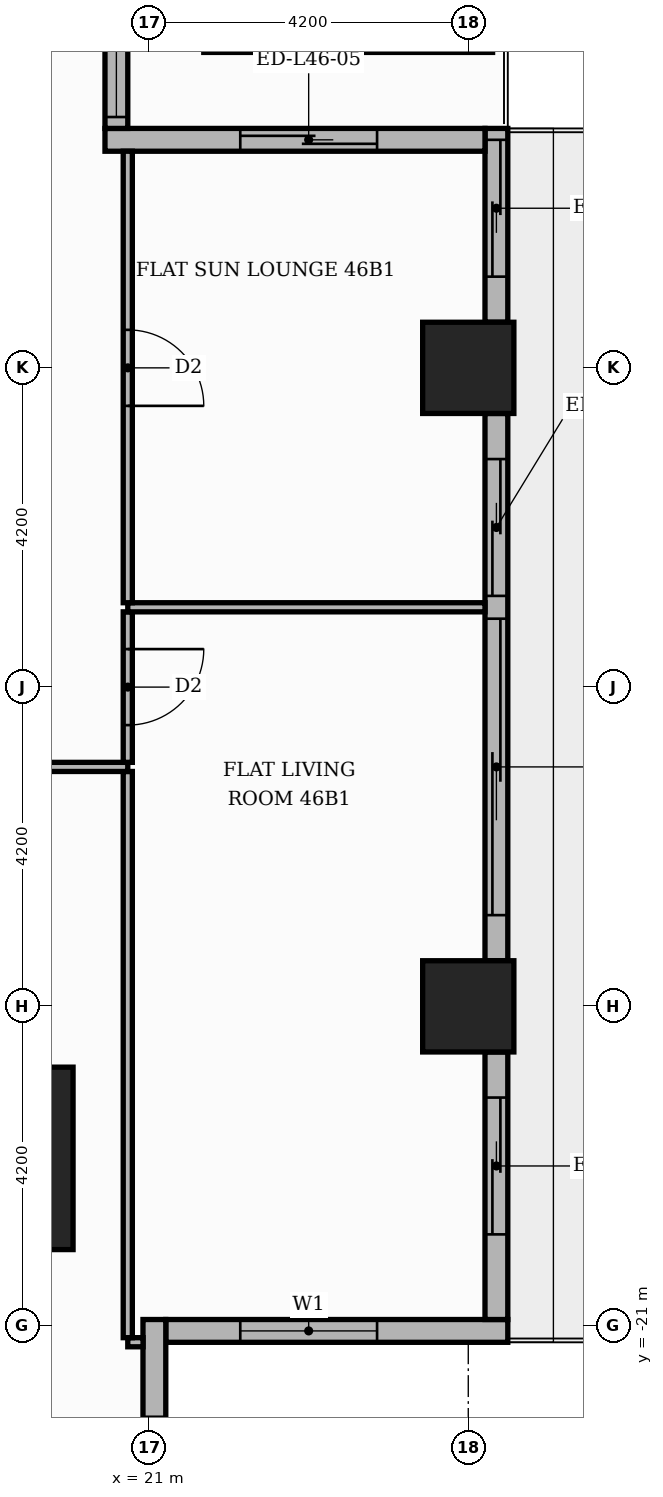
"""IFC4 building model, lengths in metres.
Left out: names, types, materials, properties, quantities, classifications, styles, units other than length and angle.
Written with IfcOpenShell. Run it as: python <this file> out.ifc"""

import sys

from ifc_helpers import new_model, si_unit, direction, frame, frame_2d, origin, origin_2d, place, context, subcontext, project, spatial, rectangle, extrude, element, fill, save


model = new_model("IFC4")
c1 = context("Model", 3, precision=1e-05, world=origin(), true_north=direction((0.0, 1.0)))
c2 = subcontext(c1, "Body", "Model", "MODEL_VIEW")
j1 = project(units=[si_unit("LENGTHUNIT", "METRE"), si_unit("PLANEANGLEUNIT", "RADIAN")], contexts=[c1])
p1 = place(None, origin())
s1 = spatial("IfcSite", under=j1, at=p1, CompositionType="ELEMENT")
p2 = place(p1, origin())
s2 = spatial("IfcBuilding", under=s1, at=p2, CompositionType="ELEMENT")
p3 = place(p2, frame((0.0, 0.0, 196.2)))
s3 = spatial("IfcBuildingStorey", under=s2, at=p3, CompositionType="ELEMENT", Elevation=196.2)
p4 = place(p3, frame((18.8, -18.8, 0.0), z_axis=(0.0, 0.0, 1.0), x_axis=(1.0, 0.0, 0.0)))
e1 = element("IfcColumn", 1, at=p4, inside=s3, PredefinedType="COLUMN", context=c2, shape_type="SweptSolid", body=[
    extrude(rectangle(XDim=2.4, YDim=2.4, at=origin_2d()), origin(), (0.0, 0.0, 1.0), 3.9),
])
for number, where, z_axis, x_axis in (
    (2, (25.2, -8.4, 0.0), (0.0, 0.0, 1.0), (1.0, 0.0, 0.0)),
    (3, (25.2, -16.8, 0.0), (0.0, 0.0, 1.0), (1.0, 0.0, 0.0)),
):
    element("IfcColumn", number, at=place(p3, frame(where, z_axis=z_axis, x_axis=x_axis)), inside=s3, PredefinedType="COLUMN", context=c2, shape_type="SweptSolid", body=[
        extrude(rectangle(XDim=1.2, YDim=1.2, at=origin_2d()), origin(), (0.0, 0.0, 1.0), 3.9),
    ])
p5 = place(p3, frame((21.22, -21.07, 0.0), z_axis=(0.0, 0.0, 1.0), x_axis=(1.0, 0.0, 0.0)))
e4 = element("IfcWall", 4, at=p5, inside=s3, PredefinedType="STANDARD", context=c2, shape_type="SweptSolid", body=[
    extrude(rectangle(XDim=4.5, YDim=0.3, at=frame_2d((2.25, 0.0))), origin(), (0.0, 0.0, 1.0), 3.48),
])
p6 = place(p5, frame((0.98, 0.0, 0.9)))
e5 = element("IfcOpeningElement", 5, at=p6, cuts=e4, PredefinedType="OPENING", context=c2, shape_type="SweptSolid", body=[
    extrude(rectangle(XDim=1.8, YDim=2.1, at=frame_2d((0.9, 1.05))), frame((0.0, 0.16, 0.0), z_axis=(0.0, -1.0, 0.0), x_axis=(1.0, 0.0, 0.0)), (0.0, 0.0, 1.0), 0.32),
])
p7 = place(p3, frame((25.57, -20.92, 0.0), z_axis=(0.0, 0.0, 1.0), x_axis=(0.0, 1.0, 0.0)))
e6 = element("IfcWall", 6, at=p7, inside=s3, PredefinedType="STANDARD", context=c2, shape_type="SweptSolid", body=[
    extrude(rectangle(XDim=3.52, YDim=0.3, at=frame_2d((1.76, 0.0))), origin(), (0.0, 0.0, 1.0), 3.48),
])
p8 = place(p7, frame((1.12, 0.0, 0.0)))
e7 = element("IfcOpeningElement", 7, at=p8, cuts=e6, PredefinedType="OPENING", context=c2, shape_type="SweptSolid", body=[
    extrude(rectangle(XDim=1.8, YDim=2.4, at=frame_2d((0.9, 1.2))), frame((0.0, 0.16, 0.0), z_axis=(0.0, -1.0, 0.0), x_axis=(1.0, 0.0, 0.0)), (0.0, 0.0, 1.0), 0.32),
])
p9 = place(p3, frame((25.57, -16.2, 0.0), z_axis=(0.0, 0.0, 1.0), x_axis=(0.0, 1.0, 0.0)))
e8 = element("IfcWall", 8, at=p9, inside=s3, PredefinedType="STANDARD", context=c2, shape_type="SweptSolid", body=[
    extrude(rectangle(XDim=7.2, YDim=0.3, at=frame_2d((3.6, 0.0))), origin(), (0.0, 0.0, 1.0), 3.48),
])
p10 = place(p9, frame((0.6, 0.0, 0.0)))
e9 = element("IfcOpeningElement", 9, at=p10, cuts=e8, PredefinedType="OPENING", context=c2, shape_type="SweptSolid", body=[
    extrude(rectangle(XDim=3.9, YDim=2.4, at=frame_2d((1.95, 1.2))), frame((0.0, 0.16, 0.0), z_axis=(0.0, -1.0, 0.0), x_axis=(1.0, 0.0, 0.0)), (0.0, 0.0, 1.0), 0.32),
])
p11 = place(p9, frame((4.8, 0.0, 0.0)))
e10 = element("IfcOpeningElement", 10, at=p11, cuts=e8, PredefinedType="OPENING", context=c2, shape_type="SweptSolid", body=[
    extrude(rectangle(XDim=1.8, YDim=2.4, at=frame_2d((0.9, 1.2))), frame((0.0, 0.16, 0.0), z_axis=(0.0, -1.0, 0.0), x_axis=(1.0, 0.0, 0.0)), (0.0, 0.0, 1.0), 0.32),
])
p12 = place(p3, frame((25.57, -7.8, 0.0), z_axis=(0.0, 0.0, 1.0), x_axis=(0.0, 1.0, 0.0)))
e11 = element("IfcWall", 11, at=p12, inside=s3, PredefinedType="STANDARD", context=c2, shape_type="SweptSolid", body=[
    extrude(rectangle(XDim=2.55, YDim=0.3, at=frame_2d((1.275, 0.0))), origin(), (0.0, 0.0, 1.0), 3.48),
])
p13 = place(p12, frame((0.6, 0.0, 0.0)))
e12 = element("IfcOpeningElement", 12, at=p13, cuts=e11, PredefinedType="OPENING", context=c2, shape_type="SweptSolid", body=[
    extrude(rectangle(XDim=1.8, YDim=2.4, at=frame_2d((0.9, 1.2))), frame((0.0, 0.16, 0.0), z_axis=(0.0, -1.0, 0.0), x_axis=(1.0, 0.0, 0.0)), (0.0, 0.0, 1.0), 0.32),
])
p14 = place(p3, frame((25.42, -5.4, 0.0), z_axis=(0.0, 0.0, 1.0), x_axis=(-1.0, 0.0, 0.0)))
e13 = element("IfcWall", 13, at=p14, inside=s3, PredefinedType="STANDARD", context=c2, shape_type="SweptSolid", body=[
    extrude(rectangle(XDim=5.0, YDim=0.3, at=frame_2d((2.5, 0.0))), origin(), (0.0, 0.0, 1.0), 3.48),
])
p15 = place(p14, frame((1.42, 0.0, 0.0)))
e14 = element("IfcOpeningElement", 14, at=p15, cuts=e13, PredefinedType="OPENING", context=c2, shape_type="SweptSolid", body=[
    extrude(rectangle(XDim=1.8, YDim=2.4, at=frame_2d((0.9, 1.2))), frame((0.0, 0.16, 0.0), z_axis=(0.0, -1.0, 0.0), x_axis=(1.0, 0.0, 0.0)), (0.0, 0.0, 1.0), 0.32),
])
p16 = place(p3, frame((20.57, -5.25, 0.0), z_axis=(0.0, 0.0, 1.0), x_axis=(0.0, 1.0, 0.0)))
e15 = element("IfcWall", 15, at=p16, inside=s3, PredefinedType="STANDARD", context=c2, shape_type="SweptSolid", body=[
    extrude(rectangle(XDim=10.8, YDim=0.3, at=frame_2d((5.4, 0.0))), origin(), (0.0, 0.0, 1.0), 3.48),
])
p17 = place(p16, frame((0.15, 0.0, 0.9)))
e16 = element("IfcOpeningElement", 16, at=p17, cuts=e15, PredefinedType="OPENING", context=c2, shape_type="SweptSolid", body=[
    extrude(rectangle(XDim=6.0, YDim=2.1, at=frame_2d((3.0, 1.05))), frame((0.0, 0.16, 0.0), z_axis=(0.0, -1.0, 0.0), x_axis=(1.0, 0.0, 0.0)), (0.0, 0.0, 1.0), 0.32),
])
p18 = place(p16, frame((6.45, 0.0, 0.9)))
e17 = element("IfcOpeningElement", 17, at=p18, cuts=e15, PredefinedType="OPENING", context=c2, shape_type="SweptSolid", body=[
    extrude(rectangle(XDim=3.9, YDim=2.1, at=frame_2d((1.95, 1.05))), frame((0.0, 0.16, 0.0), z_axis=(0.0, -1.0, 0.0), x_axis=(1.0, 0.0, 0.0)), (0.0, 0.0, 1.0), 0.32),
])
p19 = place(p3, frame((21.07, -25.42, 0.0), z_axis=(0.0, 0.0, 1.0), x_axis=(0.0, 1.0, 0.0)))
e18 = element("IfcWall", 18, at=p19, inside=s3, PredefinedType="STANDARD", context=c2, shape_type="SweptSolid", body=[
    extrude(rectangle(XDim=4.5, YDim=0.3, at=frame_2d((2.25, 0.0))), origin(), (0.0, 0.0, 1.0), 3.48),
])
p20 = place(p19, frame((1.42, 0.0, 0.9)))
e19 = element("IfcOpeningElement", 19, at=p20, cuts=e18, PredefinedType="OPENING", context=c2, shape_type="SweptSolid", body=[
    extrude(rectangle(XDim=1.8, YDim=2.1, at=frame_2d((0.9, 1.05))), frame((0.0, 0.16, 0.0), z_axis=(0.0, -1.0, 0.0), x_axis=(1.0, 0.0, 0.0)), (0.0, 0.0, 1.0), 0.32),
])
p21 = place(p3, frame((20.72, -21.219, 0.0), z_axis=(0.0, 0.0, 1.0), x_axis=(1.0, 0.0, 0.0)))
e20 = element("IfcWall", 20, at=p21, inside=s3, PredefinedType="PARTITIONING", context=c2, shape_type="SweptSolid", body=[
    extrude(rectangle(XDim=0.201, YDim=0.12, at=frame_2d((0.101, 0.0))), origin(), (0.0, 0.0, 1.0), 3.48),
])
p22 = place(p3, frame((20.72, -21.159, 0.0), z_axis=(0.0, 0.0, 1.0), x_axis=(0.0, 1.0, 0.0)))
e21 = element("IfcWall", 21, at=p22, inside=s3, PredefinedType="PARTITIONING", context=c2, shape_type="SweptSolid", body=[
    extrude(rectangle(XDim=7.449, YDim=0.12, at=frame_2d((3.725, 0.0))), origin(), (0.0, 0.0, 1.0), 3.48),
])
p23 = place(p3, frame((13.65, -13.65, 0.0), z_axis=(0.0, 0.0, 1.0), x_axis=(1.0, 0.0, 0.0)))
e22 = element("IfcWall", 22, at=p23, inside=s3, PredefinedType="PARTITIONING", context=c2, shape_type="SweptSolid", body=[
    extrude(rectangle(XDim=7.07, YDim=0.12, at=frame_2d((3.535, 0.0))), origin(), (0.0, 0.0, 1.0), 3.48),
])
p24 = place(p23, frame((3.085, 0.0, 0.0)))
e23 = element("IfcOpeningElement", 23, at=p24, cuts=e22, PredefinedType="OPENING", context=c2, shape_type="SweptSolid", body=[
    extrude(rectangle(XDim=0.9, YDim=2.1, at=frame_2d((0.45, 1.05))), frame((0.0, 0.07, 0.0), z_axis=(0.0, -1.0, 0.0), x_axis=(1.0, 0.0, 0.0)), (0.0, 0.0, 1.0), 0.14),
])
p25 = place(p3, frame((20.72, -13.59, 0.0), z_axis=(0.0, 0.0, 1.0), x_axis=(0.0, 1.0, 0.0)))
e24 = element("IfcWall", 24, at=p25, inside=s3, PredefinedType="PARTITIONING", context=c2, shape_type="SweptSolid", body=[
    extrude(rectangle(XDim=1.98, YDim=0.12, at=frame_2d((0.99, 0.0))), origin(), (0.0, 0.0, 1.0), 3.48),
])
p26 = place(p25, frame((0.49, 0.0, 0.0)))
e25 = element("IfcOpeningElement", 25, at=p26, cuts=e24, PredefinedType="OPENING", context=c2, shape_type="SweptSolid", body=[
    extrude(rectangle(XDim=1.0, YDim=2.1, at=frame_2d((0.5, 1.05))), frame((0.0, 0.07, 0.0), z_axis=(0.0, -1.0, 0.0), x_axis=(1.0, 0.0, 0.0)), (0.0, 0.0, 1.0), 0.14),
])
p27 = place(p3, frame((20.72, -11.55, 0.0), z_axis=(0.0, 0.0, 1.0), x_axis=(1.0, 0.0, 0.0)))
e26 = element("IfcWall", 26, at=p27, inside=s3, PredefinedType="PARTITIONING", context=c2, shape_type="SweptSolid", body=[
    extrude(rectangle(XDim=4.7, YDim=0.12, at=frame_2d((2.35, 0.0))), origin(), (0.0, 0.0, 1.0), 3.48),
])
p28 = place(p3, frame((20.72, -11.49, 0.0), z_axis=(0.0, 0.0, 1.0), x_axis=(0.0, 1.0, 0.0)))
e27 = element("IfcWall", 27, at=p28, inside=s3, PredefinedType="PARTITIONING", context=c2, shape_type="SweptSolid", body=[
    extrude(rectangle(XDim=5.94, YDim=0.12, at=frame_2d((2.97, 0.0))), origin(), (0.0, 0.0, 1.0), 3.48),
])
p29 = place(p28, frame((2.59, 0.0, 0.0)))
e28 = element("IfcOpeningElement", 28, at=p29, cuts=e27, PredefinedType="OPENING", context=c2, shape_type="SweptSolid", body=[
    extrude(rectangle(XDim=1.0, YDim=2.1, at=frame_2d((0.5, 1.05))), frame((0.0, 0.07, 0.0), z_axis=(0.0, -1.0, 0.0), x_axis=(1.0, 0.0, 0.0)), (0.0, 0.0, 1.0), 0.14),
])
p30 = place(p6, origin())
e29 = element("IfcWindow", 29, at=p30, inside=s3, PartitioningType="SINGLE_PANEL", PredefinedType="WINDOW", context=c2, shape_type="SweptSolid", body=[
    extrude(rectangle(XDim=1.8, YDim=2.1, at=frame_2d((0.9, 1.05))), frame((0.0, 0.03, 0.0), z_axis=(0.0, -1.0, 0.0), x_axis=(1.0, 0.0, 0.0)), (0.0, 0.0, 1.0), 0.06),
])
fill(e5, e29)
p31 = place(p8, origin())
e30 = element("IfcDoor", 30, at=p31, inside=s3, OperationType="SLIDING_TO_RIGHT", PredefinedType="DOOR", context=c2, shape_type="SweptSolid", body=[
    extrude(rectangle(XDim=1.8, YDim=2.4, at=frame_2d((0.9, 1.2))), frame((0.0, 0.025, 0.0), z_axis=(0.0, -1.0, 0.0), x_axis=(1.0, 0.0, 0.0)), (0.0, 0.0, 1.0), 0.05),
])
fill(e7, e30)
p32 = place(p10, origin())
e31 = element("IfcDoor", 31, at=p32, inside=s3, OperationType="SLIDING_TO_LEFT", PredefinedType="DOOR", context=c2, shape_type="SweptSolid", body=[
    extrude(rectangle(XDim=3.9, YDim=2.4, at=frame_2d((1.95, 1.2))), frame((0.0, 0.025, 0.0), z_axis=(0.0, -1.0, 0.0), x_axis=(1.0, 0.0, 0.0)), (0.0, 0.0, 1.0), 0.05),
])
fill(e9, e31)
p33 = place(p11, origin())
e32 = element("IfcDoor", 32, at=p33, inside=s3, OperationType="SLIDING_TO_RIGHT", PredefinedType="DOOR", context=c2, shape_type="SweptSolid", body=[
    extrude(rectangle(XDim=1.8, YDim=2.4, at=frame_2d((0.9, 1.2))), frame((0.0, 0.025, 0.0), z_axis=(0.0, -1.0, 0.0), x_axis=(1.0, 0.0, 0.0)), (0.0, 0.0, 1.0), 0.05),
])
fill(e10, e32)
p34 = place(p13, origin())
e33 = element("IfcDoor", 33, at=p34, inside=s3, OperationType="SLIDING_TO_LEFT", PredefinedType="DOOR", context=c2, shape_type="SweptSolid", body=[
    extrude(rectangle(XDim=1.8, YDim=2.4, at=frame_2d((0.9, 1.2))), frame((0.0, 0.025, 0.0), z_axis=(0.0, -1.0, 0.0), x_axis=(1.0, 0.0, 0.0)), (0.0, 0.0, 1.0), 0.05),
])
fill(e12, e33)
p35 = place(p15, origin())
e34 = element("IfcDoor", 34, at=p35, inside=s3, OperationType="SLIDING_TO_LEFT", PredefinedType="DOOR", context=c2, shape_type="SweptSolid", body=[
    extrude(rectangle(XDim=1.8, YDim=2.4, at=frame_2d((0.9, 1.2))), frame((0.0, 0.025, 0.0), z_axis=(0.0, -1.0, 0.0), x_axis=(1.0, 0.0, 0.0)), (0.0, 0.0, 1.0), 0.05),
])
fill(e14, e34)
p36 = place(p17, origin())
e35 = element("IfcWindow", 35, at=p36, inside=s3, PartitioningType="SINGLE_PANEL", PredefinedType="WINDOW", context=c2, shape_type="SweptSolid", body=[
    extrude(rectangle(XDim=6.0, YDim=2.1, at=frame_2d((3.0, 1.05))), frame((0.0, 0.03, 0.0), z_axis=(0.0, -1.0, 0.0), x_axis=(1.0, 0.0, 0.0)), (0.0, 0.0, 1.0), 0.06),
])
fill(e16, e35)
p37 = place(p20, origin())
e36 = element("IfcWindow", 36, at=p37, inside=s3, PartitioningType="SINGLE_PANEL", PredefinedType="WINDOW", context=c2, shape_type="SweptSolid", body=[
    extrude(rectangle(XDim=1.8, YDim=2.1, at=frame_2d((0.9, 1.05))), frame((0.0, 0.03, 0.0), z_axis=(0.0, -1.0, 0.0), x_axis=(1.0, 0.0, 0.0)), (0.0, 0.0, 1.0), 0.06),
])
fill(e19, e36)
p38 = place(p26, frame((1.0, 0.0, 0.0), z_axis=(0.0, 0.0, 1.0), x_axis=(-1.0, 0.0, 0.0)))
e37 = element("IfcDoor", 37, at=p38, inside=s3, OperationType="SINGLE_SWING_RIGHT", PredefinedType="DOOR", context=c2, shape_type="SweptSolid", body=[
    extrude(rectangle(XDim=1.0, YDim=2.1, at=frame_2d((0.5, 1.05))), frame((0.0, 0.025, 0.0), z_axis=(0.0, -1.0, 0.0), x_axis=(1.0, 0.0, 0.0)), (0.0, 0.0, 1.0), 0.05),
])
fill(e25, e37)
p39 = place(p29, frame((1.0, 0.0, 0.0), z_axis=(0.0, 0.0, 1.0), x_axis=(-1.0, 0.0, 0.0)))
e38 = element("IfcDoor", 38, at=p39, inside=s3, OperationType="SINGLE_SWING_LEFT", PredefinedType="DOOR", context=c2, shape_type="SweptSolid", body=[
    extrude(rectangle(XDim=1.0, YDim=2.1, at=frame_2d((0.5, 1.05))), frame((0.0, 0.025, 0.0), z_axis=(0.0, -1.0, 0.0), x_axis=(1.0, 0.0, 0.0)), (0.0, 0.0, 1.0), 0.05),
])
fill(e28, e38)
save(model, sys.argv[1])
